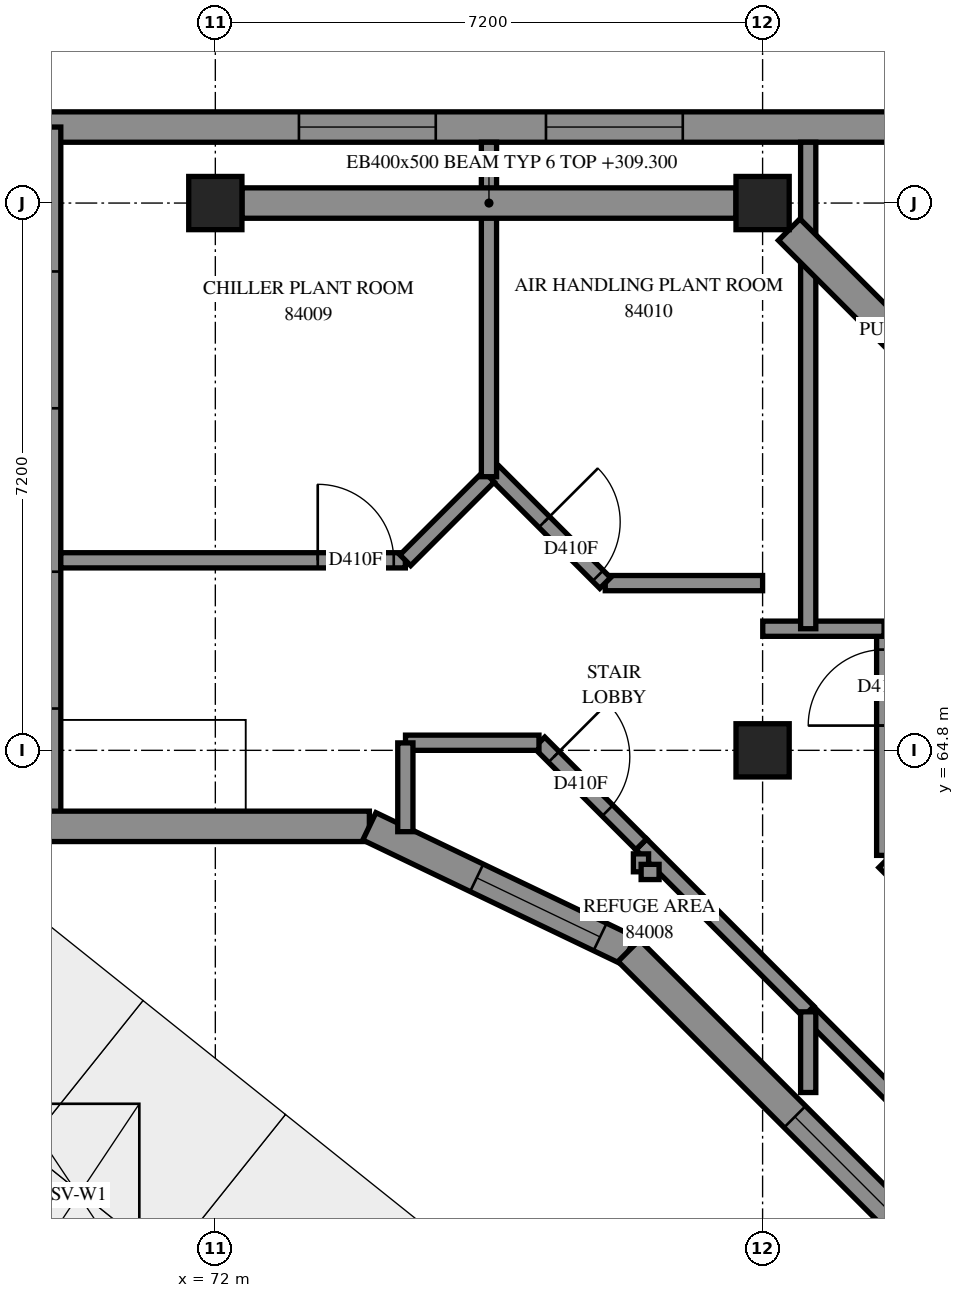
"""IFC4 building model, lengths in metres.
Left out: names, types, materials, properties, quantities, classifications, styles, units other than length and angle.
Written with IfcOpenShell. Run it as: python <this file> out.ifc"""

import sys

from ifc_helpers import new_model, si_unit, direction, frame, frame_2d, origin, origin_2d, place, context, subcontext, project, spatial, polyline, rectangle, outline, extrude, element, fill, save


model = new_model("IFC4")
c1 = context("Model", 3, precision=1e-05, world=origin(), true_north=direction((0.0, 1.0)))
c2 = subcontext(c1, "Body", "Model", "MODEL_VIEW")
j1 = project(units=[si_unit("LENGTHUNIT", "METRE"), si_unit("PLANEANGLEUNIT", "RADIAN")], contexts=[c1])
p1 = place(None, origin())
s1 = spatial("IfcSite", under=j1, at=p1, CompositionType="ELEMENT")
p2 = place(p1, origin())
s2 = spatial("IfcBuilding", under=s1, at=p2, CompositionType="ELEMENT")
p3 = place(p2, frame((0.0, 0.0, 309.6)))
s3 = spatial("IfcBuildingStorey", under=s2, at=p3, CompositionType="ELEMENT", Elevation=309.6)
for number, where, z_axis, x_axis in (
    (1, (72.0, 72.0, 0.0), (0.0, 0.0, 1.0), (1.0, 0.0, 0.0)),
    (2, (79.2, 64.8, 0.0), (0.0, 0.0, 1.0), (1.0, 0.0, 0.0)),
    (3, (79.2, 72.0, 0.0), (0.0, 0.0, 1.0), (1.0, 0.0, 0.0)),
):
    element("IfcColumn", number, at=place(p3, frame(where, z_axis=z_axis, x_axis=x_axis)), inside=s3, PredefinedType="COLUMN", context=c2, shape_type="SweptSolid", body=[
        extrude(rectangle(XDim=0.7, YDim=0.7, at=origin_2d()), origin(), (0.0, 0.0, 1.0), 3.5),
    ])
p4 = place(p3, frame((81.316, 73.0, 0.0), z_axis=(0.0, 0.0, 1.0), x_axis=(-1.0, 0.0, 0.0)))
e4 = element("IfcWall", 4, at=p4, inside=s3, PredefinedType="SOLIDWALL", context=c2, shape_type="SweptSolid", body=[
    extrude(outline(polyline([(-0.121, -0.2), (11.749, -0.2), (11.349, 0.2), (0.121, 0.2), (-0.121, -0.2)])), origin(), (0.0, 0.0, 1.0), 3.5),
])
p5 = place(p4, frame((3.166, 0.0, 0.7)))
e5 = element("IfcOpeningElement", 5, at=p5, cuts=e4, PredefinedType="OPENING", context=c2, shape_type="SweptSolid", body=[
    extrude(rectangle(XDim=1.8, YDim=2.2, at=frame_2d((0.9, 1.1))), frame((0.0, 0.21, 0.0), z_axis=(0.0, -1.0, 0.0), x_axis=(1.0, 0.0, 0.0)), (0.0, 0.0, 1.0), 0.42),
])
p6 = place(p4, frame((6.416, 0.0, 0.7)))
e6 = element("IfcOpeningElement", 6, at=p6, cuts=e4, PredefinedType="OPENING", context=c2, shape_type="SweptSolid", body=[
    extrude(rectangle(XDim=1.8, YDim=2.2, at=frame_2d((0.9, 1.1))), frame((0.0, 0.21, 0.0), z_axis=(0.0, -1.0, 0.0), x_axis=(1.0, 0.0, 0.0)), (0.0, 0.0, 1.0), 0.42),
])
p7 = place(p3, frame((69.767, 73.0, 0.0), z_axis=(0.0, 0.0, 1.0), x_axis=(0.0, -1.0, 0.0)))
e7 = element("IfcWall", 7, at=p7, inside=s3, PredefinedType="SOLIDWALL", context=c2, shape_type="SweptSolid", body=[
    extrude(outline(polyline([(-0.2, -0.2), (9.4, -0.2), (9.0, 0.2), (0.2, 0.2), (-0.2, -0.2)])), origin(), (0.0, 0.0, 1.0), 3.5),
])
p8 = place(p7, frame((1.9, 0.0, 0.7)))
e8 = element("IfcOpeningElement", 8, at=p8, cuts=e7, PredefinedType="OPENING", context=c2, shape_type="SweptSolid", body=[
    extrude(rectangle(XDim=1.8, YDim=2.2, at=frame_2d((0.9, 1.1))), frame((0.0, 0.21, 0.0), z_axis=(0.0, -1.0, 0.0), x_axis=(1.0, 0.0, 0.0)), (0.0, 0.0, 1.0), 0.42),
])
p9 = place(p7, frame((5.85, 0.0, 0.7)))
e9 = element("IfcOpeningElement", 9, at=p9, cuts=e7, PredefinedType="OPENING", context=c2, shape_type="SweptSolid", body=[
    extrude(rectangle(XDim=1.8, YDim=2.2, at=frame_2d((0.9, 1.1))), frame((0.0, 0.21, 0.0), z_axis=(0.0, -1.0, 0.0), x_axis=(1.0, 0.0, 0.0)), (0.0, 0.0, 1.0), 0.42),
])
p10 = place(p3, frame((69.767, 63.8, 0.0), z_axis=(0.0, 0.0, 1.0), x_axis=(1.0, 0.0, 0.0)))
e10 = element("IfcWall", 10, at=p10, inside=s3, PredefinedType="SOLIDWALL", context=c2, shape_type="SweptSolid", body=[
    extrude(outline(polyline([(-0.2, -0.2), (4.214, -0.2), (4.305, 0.2), (0.2, 0.2), (-0.2, -0.2)])), origin(), (0.0, 0.0, 1.0), 3.5),
])
p11 = place(p3, frame((74.027, 63.8, 0.0), z_axis=(0.0, 0.0, 1.0), x_axis=(0.9017385778, -0.43228178, 0.0)))
e11 = element("IfcWall", 11, at=p11, inside=s3, PredefinedType="SOLIDWALL", context=c2, shape_type="SweptSolid", body=[
    extrude(outline(polyline([(0.045, -0.2), (3.751, -0.2), (3.819, 0.2), (-0.045, 0.2), (0.045, -0.2)])), origin(), (0.0, 0.0, 1.0), 3.5),
])
p12 = place(p11, frame((1.566, 0.0, 0.7)))
e12 = element("IfcOpeningElement", 12, at=p12, cuts=e11, PredefinedType="OPENING", context=c2, shape_type="SweptSolid", body=[
    extrude(rectangle(XDim=1.8, YDim=2.2, at=frame_2d((0.9, 1.1))), frame((0.0, 0.21, 0.0), z_axis=(0.0, -1.0, 0.0), x_axis=(1.0, 0.0, 0.0)), (0.0, 0.0, 1.0), 0.42),
])
p13 = place(p3, frame((77.439, 62.164, 0.0), z_axis=(0.0, 0.0, 1.0), x_axis=(0.7071067812, -0.7071067812, 0.0)))
e13 = element("IfcWall", 13, at=p13, inside=s3, PredefinedType="SOLIDWALL", context=c2, shape_type="SweptSolid", body=[
    extrude(outline(polyline([(0.034, -0.2), (7.024, -0.2), (7.024, 0.2), (-0.034, 0.2), (0.034, -0.2)])), origin(), (0.0, 0.0, 1.0), 3.5),
])
p14 = place(p13, frame((3.09, 0.0, 0.7)))
e14 = element("IfcOpeningElement", 14, at=p14, cuts=e13, PredefinedType="OPENING", context=c2, shape_type="SweptSolid", body=[
    extrude(rectangle(XDim=1.8, YDim=2.2, at=frame_2d((0.9, 1.1))), frame((0.0, 0.21, 0.0), z_axis=(0.0, -1.0, 0.0), x_axis=(1.0, 0.0, 0.0)), (0.0, 0.0, 1.0), 0.42),
])
p15 = place(p3, frame((79.8, 61.36, 0.0), z_axis=(0.0, 0.0, 1.0), x_axis=(0.7068402, -0.707373262, 0.0)))
e15 = element("IfcWall", 15, at=p15, inside=s3, PredefinedType="PARTITIONING", context=c2, shape_type="SweptSolid", body=[
    extrude(rectangle(XDim=3.752, YDim=0.2, at=frame_2d((1.876, 0.0))), origin(), (0.0, 0.0, 1.0), 3.5),
])
p16 = place(p3, frame((69.967, 67.3, 0.0), z_axis=(0.0, 0.0, 1.0), x_axis=(1.0, 0.0, 0.0)))
e16 = element("IfcWall", 16, at=p16, inside=s3, PredefinedType="PARTITIONING", context=c2, shape_type="SweptSolid", body=[
    extrude(rectangle(XDim=4.533, YDim=0.2, at=frame_2d((2.267, 0.0))), origin(), (0.0, 0.0, 1.0), 3.5),
])
p17 = place(p16, frame((3.38, 0.0, 0.0)))
e17 = element("IfcOpeningElement", 17, at=p17, cuts=e16, PredefinedType="OPENING", context=c2, shape_type="SweptSolid", body=[
    extrude(rectangle(XDim=1.0, YDim=2.1, at=frame_2d((0.5, 1.05))), frame((0.0, 0.11, 0.0), z_axis=(0.0, -1.0, 0.0), x_axis=(1.0, 0.0, 0.0)), (0.0, 0.0, 1.0), 0.22),
])
p18 = place(p3, frame((80.801, 63.329, 0.0), z_axis=(0.0, 0.0, 1.0), x_axis=(0.7073894543, -0.7068239951, 0.0)))
e18 = element("IfcWall", 18, at=p18, inside=s3, PredefinedType="PARTITIONING", context=c2, shape_type="SweptSolid", body=[
    extrude(rectangle(XDim=3.537, YDim=0.2, at=frame_2d((1.768, 0.0))), origin(), (0.0, 0.0, 1.0), 3.5),
])
p19 = place(p18, frame((2.041, 0.0, 0.0)))
e19 = element("IfcOpeningElement", 19, at=p19, cuts=e18, PredefinedType="OPENING", context=c2, shape_type="SweptSolid", body=[
    extrude(rectangle(XDim=1.0, YDim=2.1, at=frame_2d((0.5, 1.05))), frame((0.0, 0.11, 0.0), z_axis=(0.0, -1.0, 0.0), x_axis=(1.0, 0.0, 0.0)), (0.0, 0.0, 1.0), 0.22),
])
p20 = place(p3, frame((80.799, 63.419, 0.0), z_axis=(0.0, 0.0, 1.0), x_axis=(0.7071067812, 0.7071067812, 0.0)))
e20 = element("IfcWall", 20, at=p20, inside=s3, PredefinedType="PARTITIONING", context=c2, shape_type="SweptSolid", body=[
    extrude(rectangle(XDim=3.043, YDim=0.2, at=frame_2d((1.522, 0.0))), origin(), (0.0, 0.0, 1.0), 3.5),
])
p21 = place(p3, frame((80.8, 63.418, 0.0), z_axis=(0.0, 0.0, 1.0), x_axis=(0.0, 1.0, 0.0)))
e21 = element("IfcWall", 21, at=p21, inside=s3, PredefinedType="PARTITIONING", context=c2, shape_type="SweptSolid", body=[
    extrude(rectangle(XDim=2.98, YDim=0.2, at=frame_2d((1.49, 0.0))), origin(), (0.0, 0.0, 1.0), 3.5),
])
p22 = place(p21, frame((1.708, 0.0, 0.0)))
e22 = element("IfcOpeningElement", 22, at=p22, cuts=e21, PredefinedType="OPENING", context=c2, shape_type="SweptSolid", body=[
    extrude(rectangle(XDim=1.0, YDim=2.1, at=frame_2d((0.5, 1.05))), frame((0.0, 0.11, 0.0), z_axis=(0.0, -1.0, 0.0), x_axis=(1.0, 0.0, 0.0)), (0.0, 0.0, 1.0), 0.22),
])
p23 = place(p3, frame((77.603, 63.563, 0.0), z_axis=(0.0, 0.0, 1.0), x_axis=(0.7071067812, -0.7071067812, 0.0)))
e23 = element("IfcWall", 23, at=p23, inside=s3, PredefinedType="PARTITIONING", context=c2, shape_type="SweptSolid", body=[
    extrude(rectangle(XDim=3.111, YDim=0.2, at=frame_2d((1.556, 0.0))), origin(), (0.0, 0.0, 1.0), 3.5),
])
p24 = place(p3, frame((77.13, 67.0, 0.0), z_axis=(0.0, 0.0, 1.0), x_axis=(1.0, 0.0, 0.0)))
e24 = element("IfcWall", 24, at=p24, inside=s3, PredefinedType="PARTITIONING", context=c2, shape_type="SweptSolid", body=[
    extrude(rectangle(XDim=2.07, YDim=0.2, at=frame_2d((1.035, 0.0))), origin(), (0.0, 0.0, 1.0), 3.5),
])
p25 = place(p3, frame((75.667, 68.465, 0.0), z_axis=(0.0, 0.0, 1.0), x_axis=(0.7066232895, -0.7075899425, 0.0)))
e25 = element("IfcWall", 25, at=p25, inside=s3, PredefinedType="PARTITIONING", context=c2, shape_type="SweptSolid", body=[
    extrude(rectangle(XDim=2.069, YDim=0.2, at=frame_2d((1.034, 0.0))), origin(), (0.0, 0.0, 1.0), 3.5),
])
p26 = place(p25, frame((0.933, 0.0, 0.0)))
e26 = element("IfcOpeningElement", 26, at=p26, cuts=e25, PredefinedType="OPENING", context=c2, shape_type="SweptSolid", body=[
    extrude(rectangle(XDim=1.0, YDim=2.1, at=frame_2d((0.5, 1.05))), frame((0.0, 0.11, 0.0), z_axis=(0.0, -1.0, 0.0), x_axis=(1.0, 0.0, 0.0)), (0.0, 0.0, 1.0), 0.22),
])
p27 = place(p3, frame((76.263, 64.903, 0.0), z_axis=(0.0, 0.0, 1.0), x_axis=(0.7071067812, -0.7071067812, 0.0)))
e27 = element("IfcWall", 27, at=p27, inside=s3, PredefinedType="PARTITIONING", context=c2, shape_type="SweptSolid", body=[
    extrude(rectangle(XDim=1.895, YDim=0.2, at=frame_2d((0.948, 0.0))), origin(), (0.0, 0.0, 1.0), 3.5),
])
p28 = place(p27, frame((0.268, 0.0, 0.0)))
e28 = element("IfcOpeningElement", 28, at=p28, cuts=e27, PredefinedType="OPENING", context=c2, shape_type="SweptSolid", body=[
    extrude(rectangle(XDim=1.0, YDim=2.1, at=frame_2d((0.5, 1.05))), frame((0.0, 0.11, 0.0), z_axis=(0.0, -1.0, 0.0), x_axis=(1.0, 0.0, 0.0)), (0.0, 0.0, 1.0), 0.22),
])
p29 = place(p3, frame((74.502, 64.9, 0.0), z_axis=(0.0, 0.0, 1.0), x_axis=(1.0, 0.0, 0.0)))
e29 = element("IfcWall", 29, at=p29, inside=s3, PredefinedType="PARTITIONING", context=c2, shape_type="SweptSolid", body=[
    extrude(rectangle(XDim=1.756, YDim=0.2, at=frame_2d((0.878, 0.0))), origin(), (0.0, 0.0, 1.0), 3.5),
])
p30 = place(p3, frame((79.8, 60.298, 0.0), z_axis=(0.0, 0.0, 1.0), x_axis=(0.0, 1.0, 0.0)))
e30 = element("IfcWall", 30, at=p30, inside=s3, PredefinedType="PARTITIONING", context=c2, shape_type="SweptSolid", body=[
    extrude(rectangle(XDim=1.062, YDim=0.2, at=frame_2d((0.531, 0.0))), origin(), (0.0, 0.0, 1.0), 3.5),
])
p31 = place(p3, frame((79.202, 66.4, 0.0), z_axis=(0.0, 0.0, 1.0), x_axis=(1.0, 0.0, 0.0)))
e31 = element("IfcWall", 31, at=p31, inside=s3, PredefinedType="PARTITIONING", context=c2, shape_type="SweptSolid", body=[
    extrude(rectangle(XDim=1.596, YDim=0.2, at=frame_2d((0.798, 0.0))), origin(), (0.0, 0.0, 1.0), 3.5),
])
p32 = place(p3, frame((74.499, 67.301, 0.0), z_axis=(0.0, 0.0, 1.0), x_axis=(0.7071067812, 0.7071067812, 0.0)))
e32 = element("IfcWall", 32, at=p32, inside=s3, PredefinedType="PARTITIONING", context=c2, shape_type="SweptSolid", body=[
    extrude(rectangle(XDim=1.556, YDim=0.2, at=frame_2d((0.778, 0.0))), origin(), (0.0, 0.0, 1.0), 3.5),
])
p33 = place(p3, frame((74.5, 63.73, 0.0), z_axis=(0.0, 0.0, 1.0), x_axis=(0.0, 1.0, 0.0)))
e33 = element("IfcWall", 33, at=p33, inside=s3, PredefinedType="PARTITIONING", context=c2, shape_type="SweptSolid", body=[
    extrude(rectangle(XDim=1.168, YDim=0.2, at=frame_2d((0.584, 0.0))), origin(), (0.0, 0.0, 1.0), 3.5),
])
for number, where, z_axis, x_axis in (
    (34, (77.6, 63.202, 0.0), (0.0, 0.0, 1.0), (0.0, 1.0, 0.0)),
    (35, (77.602, 63.2, 0.0), (0.0, 0.0, 1.0), (1.0, 0.0, 0.0)),
):
    element("IfcWall", number, at=place(p3, frame(where, z_axis=z_axis, x_axis=x_axis)), inside=s3, PredefinedType="PARTITIONING", context=c2, shape_type="SweptSolid", body=[
        extrude(rectangle(XDim=0.236, YDim=0.2, at=frame_2d((0.118, 0.0))), origin(), (0.0, 0.0, 1.0), 3.5),
    ])
p34 = place(p3, frame((79.8, 66.4, 0.0), z_axis=(0.0, 0.0, 1.0), x_axis=(0.0, 1.0, 0.0)))
e36 = element("IfcWall", 36, at=p34, inside=s3, PredefinedType="PARTITIONING", context=c2, shape_type="SweptSolid", body=[
    extrude(outline(polyline([(0.0, -0.1), (6.4, -0.1), (6.4, 0.1), (0.0, 0.1), (0.0, -0.1)])), origin(), (0.0, 0.0, 1.0), 3.5),
])
p35 = place(p3, frame((75.6, 68.4, 0.0), z_axis=(0.0, 0.0, 1.0), x_axis=(0.0, 1.0, 0.0)))
e37 = element("IfcWall", 37, at=p35, inside=s3, PredefinedType="PARTITIONING", context=c2, shape_type="SweptSolid", body=[
    extrude(outline(polyline([(0.0, -0.1), (4.4, -0.1), (4.4, 0.1), (0.0, 0.1), (0.0, -0.1)])), origin(), (0.0, 0.0, 1.0), 3.5),
])
p36 = place(p5, origin())
e38 = element("IfcWindow", 38, at=p36, inside=s3, PartitioningType="SINGLE_PANEL", PredefinedType="WINDOW", context=c2, shape_type="SweptSolid", body=[
    extrude(rectangle(XDim=1.8, YDim=2.2, at=frame_2d((0.9, 1.1))), frame((0.0, 0.08, 0.0), z_axis=(0.0, -1.0, 0.0), x_axis=(1.0, 0.0, 0.0)), (0.0, 0.0, 1.0), 0.06),
])
fill(e5, e38)
p37 = place(p6, origin())
e39 = element("IfcWindow", 39, at=p37, inside=s3, PartitioningType="SINGLE_PANEL", PredefinedType="WINDOW", context=c2, shape_type="SweptSolid", body=[
    extrude(rectangle(XDim=1.8, YDim=2.2, at=frame_2d((0.9, 1.1))), frame((0.0, 0.08, 0.0), z_axis=(0.0, -1.0, 0.0), x_axis=(1.0, 0.0, 0.0)), (0.0, 0.0, 1.0), 0.06),
])
fill(e6, e39)
p38 = place(p12, origin())
e40 = element("IfcWindow", 40, at=p38, inside=s3, PartitioningType="SINGLE_PANEL", PredefinedType="WINDOW", context=c2, shape_type="SweptSolid", body=[
    extrude(rectangle(XDim=1.8, YDim=2.2, at=frame_2d((0.9, 1.1))), frame((0.0, 0.08, 0.0), z_axis=(0.0, -1.0, 0.0), x_axis=(1.0, 0.0, 0.0)), (0.0, 0.0, 1.0), 0.06),
])
fill(e12, e40)
p39 = place(p14, origin())
e41 = element("IfcWindow", 41, at=p39, inside=s3, PartitioningType="SINGLE_PANEL", PredefinedType="WINDOW", context=c2, shape_type="SweptSolid", body=[
    extrude(rectangle(XDim=1.8, YDim=2.2, at=frame_2d((0.9, 1.1))), frame((0.0, 0.08, 0.0), z_axis=(0.0, -1.0, 0.0), x_axis=(1.0, 0.0, 0.0)), (0.0, 0.0, 1.0), 0.06),
])
fill(e14, e41)
p40 = place(p28, origin())
e42 = element("IfcDoor", 42, at=p40, inside=s3, OperationType="SINGLE_SWING_RIGHT", PredefinedType="DOOR", context=c2, shape_type="SweptSolid", body=[
    extrude(rectangle(XDim=1.0, YDim=2.1, at=frame_2d((0.5, 1.05))), frame((0.0, 0.025, 0.0), z_axis=(0.0, -1.0, 0.0), x_axis=(1.0, 0.0, 0.0)), (0.0, 0.0, 1.0), 0.05),
])
fill(e28, e42)
p41 = place(p17, origin())
e43 = element("IfcDoor", 43, at=p41, inside=s3, OperationType="SINGLE_SWING_RIGHT", PredefinedType="DOOR", context=c2, shape_type="SweptSolid", body=[
    extrude(rectangle(XDim=1.0, YDim=2.1, at=frame_2d((0.5, 1.05))), frame((0.0, 0.025, 0.0), z_axis=(0.0, -1.0, 0.0), x_axis=(1.0, 0.0, 0.0)), (0.0, 0.0, 1.0), 0.05),
])
fill(e17, e43)
p42 = place(p26, origin())
e44 = element("IfcDoor", 44, at=p42, inside=s3, OperationType="SINGLE_SWING_LEFT", PredefinedType="DOOR", context=c2, shape_type="SweptSolid", body=[
    extrude(rectangle(XDim=1.0, YDim=2.1, at=frame_2d((0.5, 1.05))), frame((0.0, 0.025, 0.0), z_axis=(0.0, -1.0, 0.0), x_axis=(1.0, 0.0, 0.0)), (0.0, 0.0, 1.0), 0.05),
])
fill(e26, e44)
p43 = place(p22, origin())
e45 = element("IfcDoor", 45, at=p43, inside=s3, OperationType="SINGLE_SWING_RIGHT", PredefinedType="DOOR", context=c2, shape_type="SweptSolid", body=[
    extrude(rectangle(XDim=1.0, YDim=2.1, at=frame_2d((0.5, 1.05))), frame((0.0, 0.025, 0.0), z_axis=(0.0, -1.0, 0.0), x_axis=(1.0, 0.0, 0.0)), (0.0, 0.0, 1.0), 0.05),
])
fill(e22, e45)
save(model, sys.argv[1])
